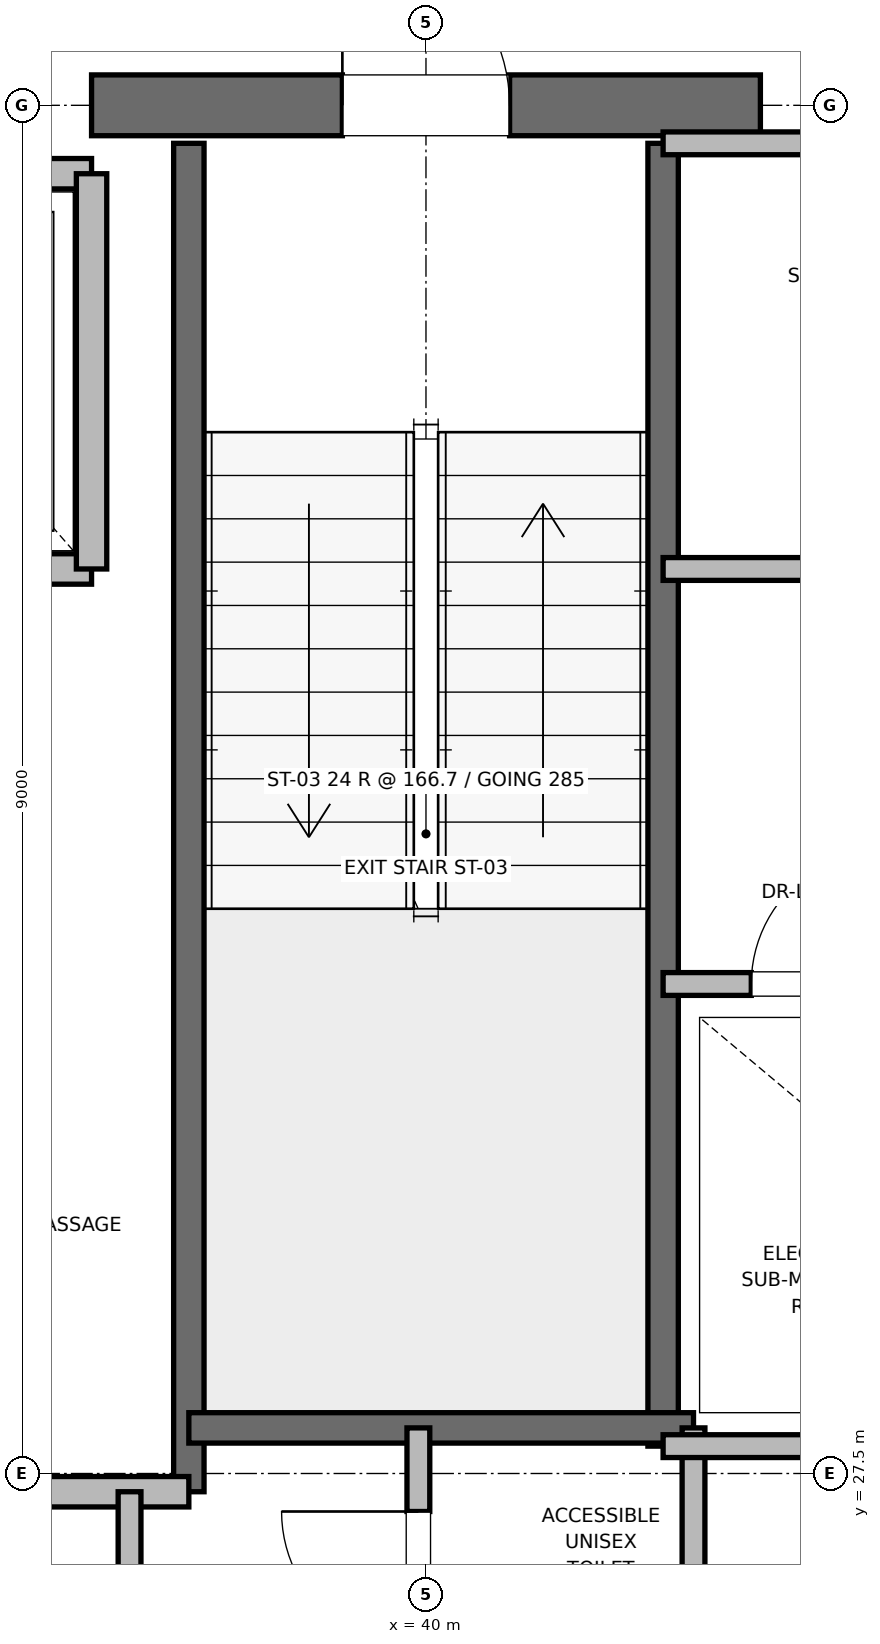
"""IFC4 building model, lengths in metres.
Left out: names, types, materials, properties, quantities, classifications, styles, units other than length and angle.
Written with IfcOpenShell. Run it as: python <this file> out.ifc"""

import sys

from ifc_helpers import new_model, si_unit, direction, frame, frame_2d, origin, place, context, subcontext, project, spatial, rectangle, extrude, element, fill, save


model = new_model("IFC4")
c1 = context("Model", 3, precision=1e-05, world=origin(), true_north=direction((0.0, 1.0)))
c2 = subcontext(c1, "Body", "Model", "MODEL_VIEW")
j1 = project(units=[si_unit("LENGTHUNIT", "METRE"), si_unit("PLANEANGLEUNIT", "RADIAN")], contexts=[c1])
p1 = place(None, origin())
s1 = spatial("IfcSite", under=j1, at=p1, CompositionType="ELEMENT")
p2 = place(p1, origin())
s2 = spatial("IfcBuilding", under=s1, at=p2, CompositionType="ELEMENT")
p3 = place(p2, frame((0.0, 0.0, 306.8)))
s3 = spatial("IfcBuildingStorey", under=s2, at=p3, CompositionType="ELEMENT", Elevation=306.8)
p4 = place(p3, frame((37.8, 36.5, 0.0), z_axis=(0.0, 0.0, 1.0), x_axis=(1.0, 0.0, 0.0)))
e1 = element("IfcWall", 1, at=p4, inside=s3, PredefinedType="SHEAR", context=c2, shape_type="SweptSolid", body=[
    extrude(rectangle(XDim=4.4, YDim=0.4, at=frame_2d((2.2, 0.0))), origin(), (0.0, 0.0, 1.0), 3.785),
])
p5 = place(p4, frame((1.65, 0.0, 0.0)))
e2 = element("IfcOpeningElement", 2, at=p5, cuts=e1, PredefinedType="OPENING", context=c2, shape_type="SweptSolid", body=[
    extrude(rectangle(XDim=1.1, YDim=2.15, at=frame_2d((0.55, 1.075))), frame((0.0, 0.2, 0.0), z_axis=(0.0, -1.0, 0.0), x_axis=(1.0, 0.0, 0.0)), (0.0, 0.0, 1.0), 0.4),
])
p6 = place(p3, frame((38.44, 27.38, 0.0), z_axis=(0.0, 0.0, 1.0), x_axis=(0.0, 1.0, 0.0)))
e3 = element("IfcWall", 3, at=p6, inside=s3, PredefinedType="SOLIDWALL", context=c2, shape_type="SweptSolid", body=[
    extrude(rectangle(XDim=8.87, YDim=0.2, at=frame_2d((4.435, 0.0))), origin(), (0.0, 0.0, 1.0), 3.785),
])
p7 = place(p3, frame((41.56, 27.68, 0.0), z_axis=(0.0, 0.0, 1.0), x_axis=(0.0, 1.0, 0.0)))
e4 = element("IfcWall", 4, at=p7, inside=s3, PredefinedType="SOLIDWALL", context=c2, shape_type="SweptSolid", body=[
    extrude(rectangle(XDim=8.57, YDim=0.2, at=frame_2d((4.285, 0.0))), origin(), (0.0, 0.0, 1.0), 3.785),
])
p8 = place(p3, frame((38.44, 27.8, 0.0), z_axis=(0.0, 0.0, 1.0), x_axis=(1.0, 0.0, 0.0)))
e5 = element("IfcWall", 5, at=p8, inside=s3, PredefinedType="SOLIDWALL", context=c2, shape_type="SweptSolid", body=[
    extrude(rectangle(XDim=3.32, YDim=0.2, at=frame_2d((1.66, 0.0))), origin(), (0.0, 0.0, 1.0), 3.785),
])
p9 = place(p3, frame((32.82, 27.38, 0.0), z_axis=(0.0, 0.0, 1.0), x_axis=(1.0, 0.0, 0.0)))
e6 = element("IfcWall", 6, at=p9, inside=s3, PredefinedType="PARTITIONING", context=c2, shape_type="SweptSolid", body=[
    extrude(rectangle(XDim=5.62, YDim=0.2, at=frame_2d((2.81, 0.0))), origin(), (0.0, 0.0, 1.0), 3.785),
])
p10 = place(p3, frame((35.5, 33.45, 0.0), z_axis=(0.0, 0.0, 1.0), x_axis=(1.0, 0.0, 0.0)))
e7 = element("IfcWall", 7, at=p10, inside=s3, PredefinedType="SOLIDWALL", context=c2, shape_type="SweptSolid", body=[
    extrude(rectangle(XDim=2.3, YDim=0.2, at=frame_2d((1.15, 0.0))), origin(), (0.0, 0.0, 1.0), 3.785),
])
p11 = place(p10, frame((0.6, 0.0, 0.0)))
e8 = element("IfcOpeningElement", 8, at=p11, cuts=e7, PredefinedType="OPENING", context=c2, shape_type="SweptSolid", body=[
    extrude(rectangle(XDim=1.1, YDim=2.2, at=frame_2d((0.55, 1.1))), frame((0.0, 0.1, 0.0), z_axis=(0.0, -1.0, 0.0), x_axis=(1.0, 0.0, 0.0)), (0.0, 0.0, 1.0), 0.2),
])
p12 = place(p3, frame((37.8, 36.05, 0.0), z_axis=(0.0, 0.0, 1.0), x_axis=(-1.0, 0.0, 0.0)))
e9 = element("IfcWall", 9, at=p12, inside=s3, PredefinedType="SOLIDWALL", context=c2, shape_type="SweptSolid", body=[
    extrude(rectangle(XDim=2.3, YDim=0.2, at=frame_2d((1.15, 0.0))), origin(), (0.0, 0.0, 1.0), 2.865),
])
p13 = place(p3, frame((37.8, 33.45, 0.0), z_axis=(0.0, 0.0, 1.0), x_axis=(0.0, 1.0, 0.0)))
e10 = element("IfcWall", 10, at=p13, inside=s3, PredefinedType="SOLIDWALL", context=c2, shape_type="SweptSolid", body=[
    extrude(rectangle(XDim=2.6, YDim=0.2, at=frame_2d((1.3, 0.0))), origin(), (0.0, 0.0, 1.0), 2.865),
])
p14 = place(p3, frame((41.76, 23.8, 0.0), z_axis=(0.0, 0.0, 1.0), x_axis=(0.0, 1.0, 0.0)))
e11 = element("IfcWall", 11, at=p14, inside=s3, PredefinedType="PARTITIONING", context=c2, shape_type="SweptSolid", body=[
    extrude(rectangle(XDim=4.0, YDim=0.15, at=frame_2d((2.0, 0.0))), origin(), (0.0, 0.0, 1.0), 2.85),
])
p15 = place(p3, frame((39.95, 25.8, 0.0), z_axis=(0.0, 0.0, 1.0), x_axis=(0.0, 1.0, 0.0)))
e12 = element("IfcWall", 12, at=p15, inside=s3, PredefinedType="PARTITIONING", context=c2, shape_type="SweptSolid", body=[
    extrude(rectangle(XDim=2.0, YDim=0.15, at=frame_2d((1.0, 0.0))), origin(), (0.0, 0.0, 1.0), 2.85),
])
p16 = place(p15, frame((0.55, 0.0, 0.0)))
e13 = element("IfcOpeningElement", 13, at=p16, cuts=e12, PredefinedType="OPENING", context=c2, shape_type="SweptSolid", body=[
    extrude(rectangle(XDim=0.9, YDim=2.1, at=frame_2d((0.45, 1.05))), frame((0.0, 0.075, 0.0), z_axis=(0.0, -1.0, 0.0), x_axis=(1.0, 0.0, 0.0)), (0.0, 0.0, 1.0), 0.15),
])
p17 = place(p3, frame((38.05, 24.5, 0.0), z_axis=(0.0, 0.0, 1.0), x_axis=(0.0, 1.0, 0.0)))
e14 = element("IfcWall", 14, at=p17, inside=s3, PredefinedType="PARTITIONING", context=c2, shape_type="SweptSolid", body=[
    extrude(rectangle(XDim=2.88, YDim=0.15, at=frame_2d((1.44, 0.0))), origin(), (0.0, 0.0, 1.0), 2.85),
])
p18 = place(p17, frame((0.94, 0.0, 0.0)))
e15 = element("IfcOpeningElement", 15, at=p18, cuts=e14, PredefinedType="OPENING", context=c2, shape_type="SweptSolid", body=[
    extrude(rectangle(XDim=1.0, YDim=2.15, at=frame_2d((0.5, 1.075))), frame((0.0, 0.075, 0.0), z_axis=(0.0, -1.0, 0.0), x_axis=(1.0, 0.0, 0.0)), (0.0, 0.0, 1.0), 0.15),
])
p19 = place(p3, frame((41.56, 27.68, 0.0), z_axis=(0.0, 0.0, 1.0), x_axis=(1.0, 0.0, 0.0)))
e16 = element("IfcWall", 16, at=p19, inside=s3, PredefinedType="PARTITIONING", context=c2, shape_type="SweptSolid", body=[
    extrude(rectangle(XDim=3.59, YDim=0.15, at=frame_2d((1.795, 0.0))), origin(), (0.0, 0.0, 1.0), 2.85),
])
p20 = place(p3, frame((41.56, 30.72, 0.0), z_axis=(0.0, 0.0, 1.0), x_axis=(1.0, 0.0, 0.0)))
e17 = element("IfcWall", 17, at=p20, inside=s3, PredefinedType="PARTITIONING", context=c2, shape_type="SweptSolid", body=[
    extrude(rectangle(XDim=2.04, YDim=0.15, at=frame_2d((1.02, 0.0))), origin(), (0.0, 0.0, 1.0), 2.85),
])
p21 = place(p20, frame((0.58, 0.0, 0.0)))
e18 = element("IfcOpeningElement", 18, at=p21, cuts=e17, PredefinedType="OPENING", context=c2, shape_type="SweptSolid", body=[
    extrude(rectangle(XDim=0.88, YDim=2.1, at=frame_2d((0.44, 1.05))), frame((0.0, 0.075, 0.0), z_axis=(0.0, -1.0, 0.0), x_axis=(1.0, 0.0, 0.0)), (0.0, 0.0, 1.0), 0.15),
])
p22 = place(p3, frame((41.56, 36.25, 0.0), z_axis=(0.0, 0.0, 1.0), x_axis=(1.0, 0.0, 0.0)))
e19 = element("IfcWall", 19, at=p22, inside=s3, PredefinedType="PARTITIONING", context=c2, shape_type="SweptSolid", body=[
    extrude(rectangle(XDim=2.94, YDim=0.15, at=frame_2d((1.47, 0.0))), origin(), (0.0, 0.0, 1.0), 2.85),
])
p23 = place(p3, frame((41.56, 33.45, 0.0), z_axis=(0.0, 0.0, 1.0), x_axis=(1.0, 0.0, 0.0)))
e20 = element("IfcWall", 20, at=p23, inside=s3, PredefinedType="PARTITIONING", context=c2, shape_type="SweptSolid", body=[
    extrude(rectangle(XDim=2.94, YDim=0.15, at=frame_2d((1.47, 0.0))), origin(), (0.0, 0.0, 1.0), 2.85),
])
p24 = place(p23, frame((1.03, 0.0, 0.0)))
e21 = element("IfcOpeningElement", 21, at=p24, cuts=e20, PredefinedType="OPENING", context=c2, shape_type="SweptSolid", body=[
    extrude(rectangle(XDim=0.88, YDim=2.1, at=frame_2d((0.44, 1.05))), frame((0.0, 0.075, 0.0), z_axis=(0.0, -1.0, 0.0), x_axis=(1.0, 0.0, 0.0)), (0.0, 0.0, 1.0), 0.15),
])
p25 = place(p5, origin())
e22 = element("IfcDoor", 22, at=p25, inside=s3, OperationType="SINGLE_SWING_LEFT", PredefinedType="DOOR", context=c2, shape_type="SweptSolid", body=[
    extrude(rectangle(XDim=1.1, YDim=2.15, at=frame_2d((0.55, 1.075))), frame((0.0, 0.025, 0.0), z_axis=(0.0, -1.0, 0.0), x_axis=(1.0, 0.0, 0.0)), (0.0, 0.0, 1.0), 0.05),
])
fill(e2, e22)
p26 = place(p16, origin())
e23 = element("IfcDoor", 23, at=p26, inside=s3, OperationType="SINGLE_SWING_RIGHT", PredefinedType="DOOR", context=c2, shape_type="SweptSolid", body=[
    extrude(rectangle(XDim=0.9, YDim=2.1, at=frame_2d((0.45, 1.05))), frame((0.0, 0.025, 0.0), z_axis=(0.0, -1.0, 0.0), x_axis=(1.0, 0.0, 0.0)), (0.0, 0.0, 1.0), 0.05),
])
fill(e13, e23)
p27 = place(p21, origin())
e24 = element("IfcDoor", 24, at=p27, inside=s3, OperationType="SINGLE_SWING_RIGHT", PredefinedType="DOOR", context=c2, shape_type="SweptSolid", body=[
    extrude(rectangle(XDim=0.88, YDim=2.1, at=frame_2d((0.44, 1.05))), frame((0.0, 0.025, 0.0), z_axis=(0.0, -1.0, 0.0), x_axis=(1.0, 0.0, 0.0)), (0.0, 0.0, 1.0), 0.05),
])
fill(e18, e24)
save(model, sys.argv[1])
